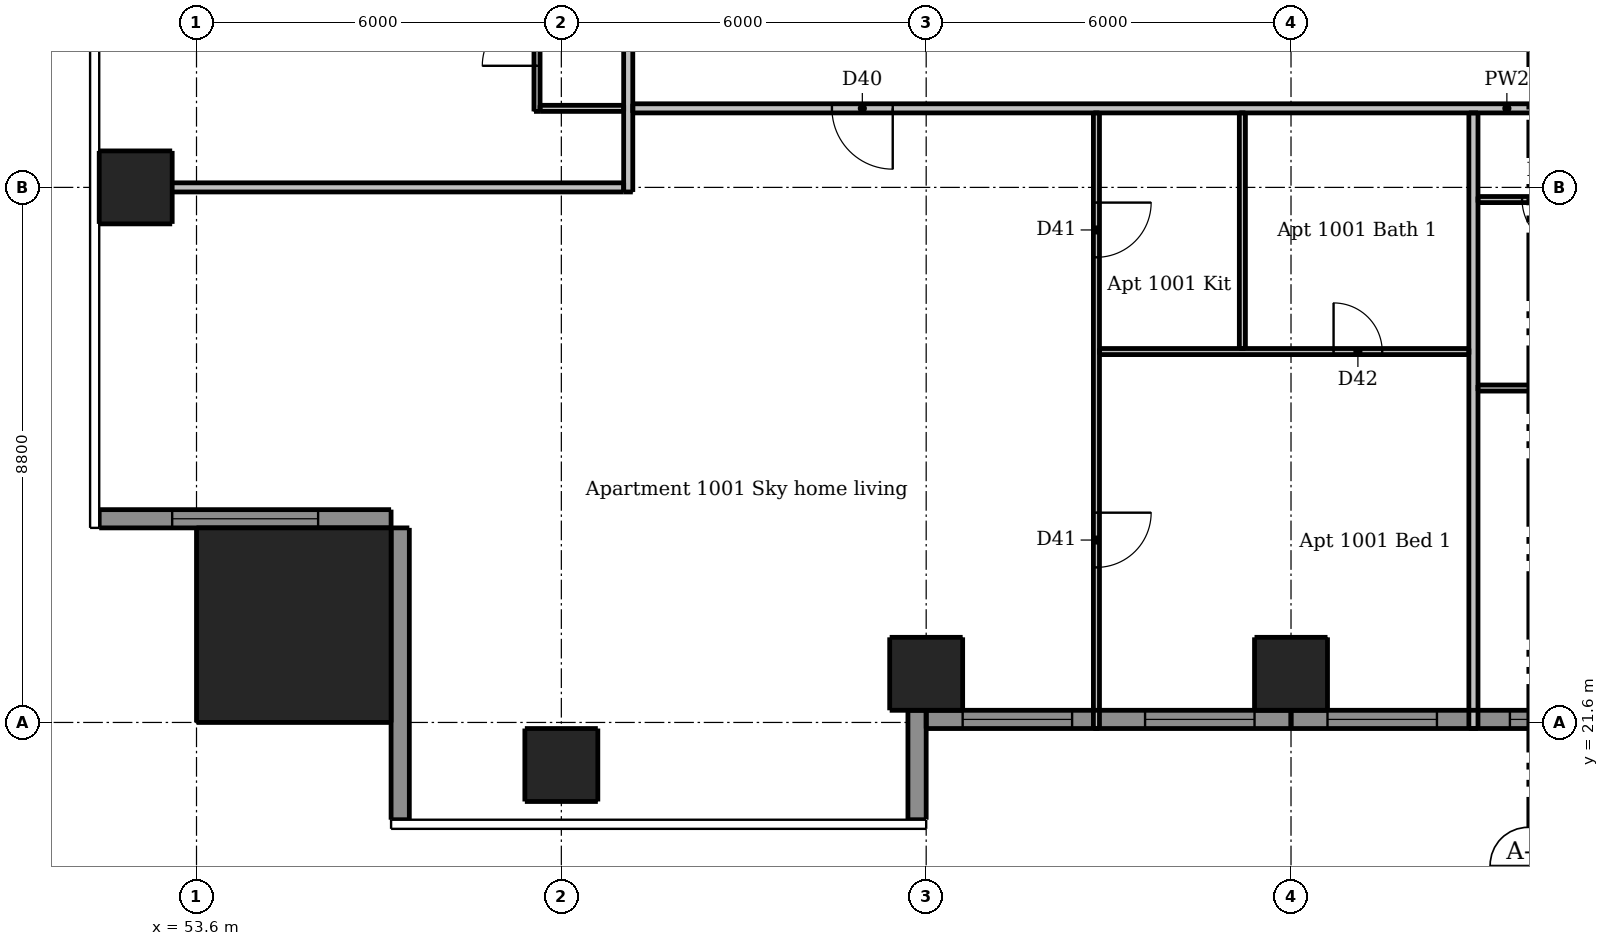
"""IFC4 building model, lengths in metres.
Left out: names, types, materials, properties, quantities, classifications, styles, units other than length and angle.
Written with IfcOpenShell. Run it as: python <this file> out.ifc"""

import sys

from ifc_helpers import new_model, si_unit, direction, frame, frame_2d, origin, origin_2d, place, context, subcontext, project, spatial, rectangle, extrude, element, fill, save


model = new_model("IFC4")
c1 = context("Model", 3, precision=1e-05, world=origin(), true_north=direction((0.0, 1.0)))
c2 = subcontext(c1, "Body", "Model", "MODEL_VIEW")
j1 = project(units=[si_unit("LENGTHUNIT", "METRE"), si_unit("PLANEANGLEUNIT", "RADIAN")], contexts=[c1])
p1 = place(None, origin())
s1 = spatial("IfcSite", under=j1, at=p1, CompositionType="ELEMENT")
p2 = place(p1, origin())
s2 = spatial("IfcBuilding", under=s1, at=p2, CompositionType="ELEMENT")
p3 = place(p2, frame((0.0, 0.0, 40.0)))
s3 = spatial("IfcBuildingStorey", under=s2, at=p3, CompositionType="ELEMENT", Elevation=40.0)
for number, where, z_axis, x_axis in (
    (1, (59.6, 20.9, 0.0), (0.0, 0.0, 1.0), (1.0, 0.0, 0.0)),
    (2, (65.6, 22.4, 0.0), (0.0, 0.0, 1.0), (1.0, 0.0, 0.0)),
    (3, (71.6, 22.4, 0.0), (0.0, 0.0, 1.0), (1.0, 0.0, 0.0)),
    (4, (52.6, 30.4, 0.0), (0.0, 0.0, 1.0), (1.0, 0.0, 0.0)),
):
    element("IfcColumn", number, at=place(p3, frame(where, z_axis=z_axis, x_axis=x_axis)), inside=s3, PredefinedType="COLUMN", context=c2, shape_type="SweptSolid", body=[
        extrude(rectangle(XDim=1.2, YDim=1.2, at=origin_2d()), origin(), (0.0, 0.0, 1.0), 3.05),
    ])
p4 = place(p3, frame((55.2, 23.2, 0.0), z_axis=(0.0, 0.0, 1.0), x_axis=(1.0, 0.0, 0.0)))
e5 = element("IfcColumn", 5, at=p4, inside=s3, PredefinedType="COLUMN", context=c2, shape_type="SweptSolid", body=[
    extrude(rectangle(XDim=3.2, YDim=3.2, at=origin_2d()), origin(), (0.0, 0.0, 1.0), 3.3),
])
p5 = place(p3, frame((65.45, 20.0, 0.0), z_axis=(0.0, 0.0, 1.0), x_axis=(0.0, 1.0, 0.0)))
e6 = element("IfcWall", 6, at=p5, inside=s3, PredefinedType="SOLIDWALL", context=c2, shape_type="SweptSolid", body=[
    extrude(rectangle(XDim=1.8, YDim=0.3, at=frame_2d((0.9, 0.0))), origin(), (0.0, 0.0, 1.0), 3.05),
])
p6 = place(p3, frame((52.0, 24.95, 0.0), z_axis=(0.0, 0.0, 1.0), x_axis=(1.0, 0.0, 0.0)))
e7 = element("IfcWall", 7, at=p6, inside=s3, PredefinedType="SOLIDWALL", context=c2, shape_type="SweptSolid", body=[
    extrude(rectangle(XDim=4.8, YDim=0.3, at=frame_2d((2.4, 0.0))), origin(), (0.0, 0.0, 1.0), 3.05),
])
p7 = place(p6, frame((1.2, 0.0, 0.15)))
e8 = element("IfcOpeningElement", 8, at=p7, cuts=e7, PredefinedType="OPENING", context=c2, shape_type="SweptSolid", body=[
    extrude(rectangle(XDim=2.4, YDim=2.1, at=frame_2d((1.2, 1.05))), frame((0.0, 0.16, 0.0), z_axis=(0.0, -1.0, 0.0), x_axis=(1.0, 0.0, 0.0)), (0.0, 0.0, 1.0), 0.32),
])
p8 = place(p3, frame((56.95, 24.8, 0.0), z_axis=(0.0, 0.0, 1.0), x_axis=(0.0, -1.0, 0.0)))
e9 = element("IfcWall", 9, at=p8, inside=s3, PredefinedType="SOLIDWALL", context=c2, shape_type="SweptSolid", body=[
    extrude(rectangle(XDim=4.8, YDim=0.3, at=frame_2d((2.4, 0.0))), origin(), (0.0, 0.0, 1.0), 3.05),
])
p9 = place(p3, frame((65.6, 21.65, 0.0), z_axis=(0.0, 0.0, 1.0), x_axis=(1.0, 0.0, 0.0)))
e10 = element("IfcWall", 10, at=p9, inside=s3, PredefinedType="SOLIDWALL", context=c2, shape_type="SweptSolid", body=[
    extrude(rectangle(XDim=6.0, YDim=0.3, at=frame_2d((3.0, 0.0))), origin(), (0.0, 0.0, 1.0), 3.05),
])
p10 = place(p9, frame((0.6, 0.0, 0.15)))
e11 = element("IfcOpeningElement", 11, at=p10, cuts=e10, PredefinedType="OPENING", context=c2, shape_type="SweptSolid", body=[
    extrude(rectangle(XDim=1.8, YDim=2.1, at=frame_2d((0.9, 1.05))), frame((0.0, 0.16, 0.0), z_axis=(0.0, -1.0, 0.0), x_axis=(1.0, 0.0, 0.0)), (0.0, 0.0, 1.0), 0.32),
])
p11 = place(p9, frame((3.6, 0.0, 0.15)))
e12 = element("IfcOpeningElement", 12, at=p11, cuts=e10, PredefinedType="OPENING", context=c2, shape_type="SweptSolid", body=[
    extrude(rectangle(XDim=1.8, YDim=2.1, at=frame_2d((0.9, 1.05))), frame((0.0, 0.16, 0.0), z_axis=(0.0, -1.0, 0.0), x_axis=(1.0, 0.0, 0.0)), (0.0, 0.0, 1.0), 0.32),
])
p12 = place(p3, frame((71.6, 21.65, 0.0), z_axis=(0.0, 0.0, 1.0), x_axis=(1.0, 0.0, 0.0)))
e13 = element("IfcWall", 13, at=p12, inside=s3, PredefinedType="SOLIDWALL", context=c2, shape_type="SweptSolid", body=[
    extrude(rectangle(XDim=5.7, YDim=0.3, at=frame_2d((2.85, 0.0))), origin(), (0.0, 0.0, 1.0), 3.05),
])
p13 = place(p12, frame((0.6, 0.0, 0.15)))
e14 = element("IfcOpeningElement", 14, at=p13, cuts=e13, PredefinedType="OPENING", context=c2, shape_type="SweptSolid", body=[
    extrude(rectangle(XDim=1.8, YDim=2.1, at=frame_2d((0.9, 1.05))), frame((0.0, 0.16, 0.0), z_axis=(0.0, -1.0, 0.0), x_axis=(1.0, 0.0, 0.0)), (0.0, 0.0, 1.0), 0.32),
])
p14 = place(p12, frame((3.6, 0.0, 0.15)))
e15 = element("IfcOpeningElement", 15, at=p14, cuts=e13, PredefinedType="OPENING", context=c2, shape_type="SweptSolid", body=[
    extrude(rectangle(XDim=1.8, YDim=2.1, at=frame_2d((0.9, 1.05))), frame((0.0, 0.16, 0.0), z_axis=(0.0, -1.0, 0.0), x_axis=(1.0, 0.0, 0.0)), (0.0, 0.0, 1.0), 0.32),
])
p15 = place(p3, frame((59.2, 31.65, 0.0), z_axis=(0.0, 0.0, 1.0), x_axis=(0.0, 1.0, 0.0)))
e16 = element("IfcWall", 16, at=p15, inside=s3, PredefinedType="PARTITIONING", context=c2, shape_type="SweptSolid", body=[
    extrude(rectangle(XDim=16.675, YDim=0.1, at=frame_2d((8.337, 0.0))), origin(), (0.0, 0.0, 1.0), 3.05),
])
p16 = place(p15, frame((9.7, 0.0, 0.0)))
e17 = element("IfcOpeningElement", 17, at=p16, cuts=e16, PredefinedType="OPENING", context=c2, shape_type="SweptSolid", body=[
    extrude(rectangle(XDim=0.9, YDim=2.1, at=frame_2d((0.45, 1.05))), frame((0.0, 0.06, 0.0), z_axis=(0.0, -1.0, 0.0), x_axis=(1.0, 0.0, 0.0)), (0.0, 0.0, 1.0), 0.12),
])
p17 = place(p15, frame((14.8, 0.0, 0.0)))
e18 = element("IfcOpeningElement", 18, at=p17, cuts=e16, PredefinedType="OPENING", context=c2, shape_type="SweptSolid", body=[
    extrude(rectangle(XDim=0.9, YDim=2.1, at=frame_2d((0.45, 1.05))), frame((0.0, 0.06, 0.0), z_axis=(0.0, -1.0, 0.0), x_axis=(1.0, 0.0, 0.0)), (0.0, 0.0, 1.0), 0.12),
])
p18 = place(p15, frame((5.25, 0.0, 0.0)))
e19 = element("IfcOpeningElement", 19, at=p18, cuts=e16, PredefinedType="OPENING", context=c2, shape_type="SweptSolid", body=[
    extrude(rectangle(XDim=0.8, YDim=2.1, at=frame_2d((0.4, 1.05))), frame((0.0, 0.06, 0.0), z_axis=(0.0, -1.0, 0.0), x_axis=(1.0, 0.0, 0.0)), (0.0, 0.0, 1.0), 0.12),
])
p19 = place(p15, frame((0.75, 0.0, 0.0)))
e20 = element("IfcOpeningElement", 20, at=p19, cuts=e16, PredefinedType="OPENING", context=c2, shape_type="SweptSolid", body=[
    extrude(rectangle(XDim=0.9, YDim=2.1, at=frame_2d((0.45, 1.05))), frame((0.0, 0.06, 0.0), z_axis=(0.0, -1.0, 0.0), x_axis=(1.0, 0.0, 0.0)), (0.0, 0.0, 1.0), 0.12),
])
p20 = place(p15, frame((3.15, 0.0, 0.0)))
e21 = element("IfcOpeningElement", 21, at=p20, cuts=e16, PredefinedType="OPENING", context=c2, shape_type="SweptSolid", body=[
    extrude(rectangle(XDim=0.8, YDim=2.1, at=frame_2d((0.4, 1.05))), frame((0.0, 0.06, 0.0), z_axis=(0.0, -1.0, 0.0), x_axis=(1.0, 0.0, 0.0)), (0.0, 0.0, 1.0), 0.12),
])
p21 = place(p3, frame((68.4, 31.625, 0.0), z_axis=(0.0, 0.0, 1.0), x_axis=(0.0, -1.0, 0.0)))
e22 = element("IfcWall", 22, at=p21, inside=s3, PredefinedType="PARTITIONING", context=c2, shape_type="SweptSolid", body=[
    extrude(rectangle(XDim=10.125, YDim=0.1, at=frame_2d((5.062, 0.0))), origin(), (0.0, 0.0, 1.0), 3.05),
])
p22 = place(p21, frame((1.475, 0.0, 0.0)))
e23 = element("IfcOpeningElement", 23, at=p22, cuts=e22, PredefinedType="OPENING", context=c2, shape_type="SweptSolid", body=[
    extrude(rectangle(XDim=0.9, YDim=2.1, at=frame_2d((0.45, 1.05))), frame((0.0, 0.06, 0.0), z_axis=(0.0, -1.0, 0.0), x_axis=(1.0, 0.0, 0.0)), (0.0, 0.0, 1.0), 0.12),
])
p23 = place(p21, frame((6.575, 0.0, 0.0)))
e24 = element("IfcOpeningElement", 24, at=p23, cuts=e22, PredefinedType="OPENING", context=c2, shape_type="SweptSolid", body=[
    extrude(rectangle(XDim=0.9, YDim=2.1, at=frame_2d((0.45, 1.05))), frame((0.0, 0.06, 0.0), z_axis=(0.0, -1.0, 0.0), x_axis=(1.0, 0.0, 0.0)), (0.0, 0.0, 1.0), 0.12),
])
p24 = place(p3, frame((70.8, 27.75, 0.0), z_axis=(0.0, 0.0, 1.0), x_axis=(0.0, 1.0, 0.0)))
e25 = element("IfcWall", 25, at=p24, inside=s3, PredefinedType="PARTITIONING", context=c2, shape_type="SweptSolid", body=[
    extrude(rectangle(XDim=3.875, YDim=0.1, at=frame_2d((1.938, 0.0))), origin(), (0.0, 0.0, 1.0), 3.05),
])
p25 = place(p3, frame((59.25, 31.7, 0.0), z_axis=(0.0, 0.0, 1.0), x_axis=(1.0, 0.0, 0.0)))
e26 = element("IfcWall", 26, at=p25, inside=s3, PredefinedType="PARTITIONING", context=c2, shape_type="SweptSolid", body=[
    extrude(rectangle(XDim=1.375, YDim=0.1, at=frame_2d((0.688, 0.0))), origin(), (0.0, 0.0, 1.0), 3.05),
])
p26 = place(p3, frame((88.25, 30.2, 0.0), z_axis=(0.0, 0.0, 1.0), x_axis=(-1.0, 0.0, 0.0)))
e27 = element("IfcWall", 27, at=p26, inside=s3, PredefinedType="PARTITIONING", context=c2, shape_type="SweptSolid", body=[
    extrude(rectangle(XDim=13.575, YDim=0.1, at=frame_2d((6.788, 0.0))), origin(), (0.0, 0.0, 1.0), 3.05),
])
p27 = place(p26, frame((7.5, 0.0, 0.0)))
e28 = element("IfcOpeningElement", 28, at=p27, cuts=e27, PredefinedType="OPENING", context=c2, shape_type="SweptSolid", body=[
    extrude(rectangle(XDim=0.9, YDim=2.1, at=frame_2d((0.45, 1.05))), frame((0.0, 0.06, 0.0), z_axis=(0.0, -1.0, 0.0), x_axis=(1.0, 0.0, 0.0)), (0.0, 0.0, 1.0), 0.12),
])
p28 = place(p26, frame((2.7, 0.0, 0.0)))
e29 = element("IfcOpeningElement", 29, at=p28, cuts=e27, PredefinedType="OPENING", context=c2, shape_type="SweptSolid", body=[
    extrude(rectangle(XDim=0.9, YDim=2.1, at=frame_2d((0.45, 1.05))), frame((0.0, 0.06, 0.0), z_axis=(0.0, -1.0, 0.0), x_axis=(1.0, 0.0, 0.0)), (0.0, 0.0, 1.0), 0.12),
])
p29 = place(p26, frame((0.35, 0.0, 0.0)))
e30 = element("IfcOpeningElement", 30, at=p29, cuts=e27, PredefinedType="OPENING", context=c2, shape_type="SweptSolid", body=[
    extrude(rectangle(XDim=0.9, YDim=2.1, at=frame_2d((0.45, 1.05))), frame((0.0, 0.06, 0.0), z_axis=(0.0, -1.0, 0.0), x_axis=(1.0, 0.0, 0.0)), (0.0, 0.0, 1.0), 0.12),
])
p30 = place(p26, frame((12.05, 0.0, 0.0)))
e31 = element("IfcOpeningElement", 31, at=p30, cuts=e27, PredefinedType="OPENING", context=c2, shape_type="SweptSolid", body=[
    extrude(rectangle(XDim=0.8, YDim=2.1, at=frame_2d((0.4, 1.05))), frame((0.0, 0.06, 0.0), z_axis=(0.0, -1.0, 0.0), x_axis=(1.0, 0.0, 0.0)), (0.0, 0.0, 1.0), 0.12),
])
p31 = place(p3, frame((68.45, 27.7, 0.0), z_axis=(0.0, 0.0, 1.0), x_axis=(1.0, 0.0, 0.0)))
e32 = element("IfcWall", 32, at=p31, inside=s3, PredefinedType="PARTITIONING", context=c2, shape_type="SweptSolid", body=[
    extrude(rectangle(XDim=6.075, YDim=0.1, at=frame_2d((3.038, 0.0))), origin(), (0.0, 0.0, 1.0), 3.05),
])
p32 = place(p31, frame((3.85, 0.0, 0.0)))
e33 = element("IfcOpeningElement", 33, at=p32, cuts=e32, PredefinedType="OPENING", context=c2, shape_type="SweptSolid", body=[
    extrude(rectangle(XDim=0.8, YDim=2.1, at=frame_2d((0.4, 1.05))), frame((0.0, 0.06, 0.0), z_axis=(0.0, -1.0, 0.0), x_axis=(1.0, 0.0, 0.0)), (0.0, 0.0, 1.0), 0.12),
])
p33 = place(p3, frame((74.675, 27.1, 0.0), z_axis=(0.0, 0.0, 1.0), x_axis=(1.0, 0.0, 0.0)))
e34 = element("IfcWall", 34, at=p33, inside=s3, PredefinedType="PARTITIONING", context=c2, shape_type="SweptSolid", body=[
    extrude(rectangle(XDim=2.275, YDim=0.1, at=frame_2d((1.137, 0.0))), origin(), (0.0, 0.0, 1.0), 3.05),
])
p34 = place(p3, frame((60.7, 30.325, 0.0), z_axis=(0.0, 0.0, 1.0), x_axis=(0.0, 1.0, 0.0)))
e35 = element("IfcWall", 35, at=p34, inside=s3, PredefinedType="PARTITIONING", context=c2, shape_type="SweptSolid", body=[
    extrude(rectangle(XDim=28.9, YDim=0.15, at=frame_2d((14.45, 0.0))), origin(), (0.0, 0.0, 1.0), 3.05),
])
p35 = place(p34, frame((9.225, 0.0, 0.0)))
e36 = element("IfcOpeningElement", 36, at=p35, cuts=e35, PredefinedType="OPENING", context=c2, shape_type="SweptSolid", body=[
    extrude(rectangle(XDim=1.0, YDim=2.1, at=frame_2d((0.5, 1.05))), frame((0.0, 0.085, 0.0), z_axis=(0.0, -1.0, 0.0), x_axis=(1.0, 0.0, 0.0)), (0.0, 0.0, 1.0), 0.17),
])
p36 = place(p34, frame((26.025, 0.0, 0.0)))
e37 = element("IfcOpeningElement", 37, at=p36, cuts=e35, PredefinedType="OPENING", context=c2, shape_type="SweptSolid", body=[
    extrude(rectangle(XDim=1.0, YDim=2.1, at=frame_2d((0.5, 1.05))), frame((0.0, 0.085, 0.0), z_axis=(0.0, -1.0, 0.0), x_axis=(1.0, 0.0, 0.0)), (0.0, 0.0, 1.0), 0.17),
])
p37 = place(p3, frame((74.6, 21.5, 0.0), z_axis=(0.0, 0.0, 1.0), x_axis=(0.0, 1.0, 0.0)))
e38 = element("IfcWall", 38, at=p37, inside=s3, PredefinedType="PARTITIONING", context=c2, shape_type="SweptSolid", body=[
    extrude(rectangle(XDim=10.125, YDim=0.15, at=frame_2d((5.062, 0.0))), origin(), (0.0, 0.0, 1.0), 3.05),
])
p38 = place(p3, frame((89.525, 31.7, 0.0), z_axis=(0.0, 0.0, 1.0), x_axis=(-1.0, 0.0, 0.0)))
e39 = element("IfcWall", 39, at=p38, inside=s3, PredefinedType="PARTITIONING", context=c2, shape_type="SweptSolid", body=[
    extrude(rectangle(XDim=28.75, YDim=0.15, at=frame_2d((14.375, 0.0))), origin(), (0.0, 0.0, 1.0), 3.05),
])
p39 = place(p38, frame((24.475, 0.0, 0.0)))
e40 = element("IfcOpeningElement", 40, at=p39, cuts=e39, PredefinedType="OPENING", context=c2, shape_type="SweptSolid", body=[
    extrude(rectangle(XDim=1.0, YDim=2.1, at=frame_2d((0.5, 1.05))), frame((0.0, 0.085, 0.0), z_axis=(0.0, -1.0, 0.0), x_axis=(1.0, 0.0, 0.0)), (0.0, 0.0, 1.0), 0.17),
])
p40 = place(p38, frame((7.575, 0.0, 0.0)))
e41 = element("IfcOpeningElement", 41, at=p40, cuts=e39, PredefinedType="OPENING", context=c2, shape_type="SweptSolid", body=[
    extrude(rectangle(XDim=1.0, YDim=2.1, at=frame_2d((0.5, 1.05))), frame((0.0, 0.085, 0.0), z_axis=(0.0, -1.0, 0.0), x_axis=(1.0, 0.0, 0.0)), (0.0, 0.0, 1.0), 0.17),
])
p41 = place(p3, frame((52.0, 30.4, 0.0), z_axis=(0.0, 0.0, 1.0), x_axis=(1.0, 0.0, 0.0)))
e42 = element("IfcWall", 42, at=p41, inside=s3, PredefinedType="PARTITIONING", context=c2, shape_type="SweptSolid", body=[
    extrude(rectangle(XDim=8.625, YDim=0.15, at=frame_2d((4.312, 0.0))), origin(), (0.0, 0.0, 1.0), 2.647),
])
p42 = place(p7, origin())
e43 = element("IfcWindow", 43, at=p42, inside=s3, PartitioningType="DOUBLE_PANEL_VERTICAL", PredefinedType="WINDOW", context=c2, shape_type="SweptSolid", body=[
    extrude(rectangle(XDim=2.4, YDim=2.1, at=frame_2d((1.2, 1.05))), frame((0.0, 0.03, 0.0), z_axis=(0.0, -1.0, 0.0), x_axis=(1.0, 0.0, 0.0)), (0.0, 0.0, 1.0), 0.06),
])
fill(e8, e43)
p43 = place(p10, origin())
e44 = element("IfcWindow", 44, at=p43, inside=s3, PartitioningType="DOUBLE_PANEL_VERTICAL", PredefinedType="WINDOW", context=c2, shape_type="SweptSolid", body=[
    extrude(rectangle(XDim=1.8, YDim=2.1, at=frame_2d((0.9, 1.05))), frame((0.0, 0.03, 0.0), z_axis=(0.0, -1.0, 0.0), x_axis=(1.0, 0.0, 0.0)), (0.0, 0.0, 1.0), 0.06),
])
fill(e11, e44)
p44 = place(p11, origin())
e45 = element("IfcWindow", 45, at=p44, inside=s3, PartitioningType="DOUBLE_PANEL_VERTICAL", PredefinedType="WINDOW", context=c2, shape_type="SweptSolid", body=[
    extrude(rectangle(XDim=1.8, YDim=2.1, at=frame_2d((0.9, 1.05))), frame((0.0, 0.03, 0.0), z_axis=(0.0, -1.0, 0.0), x_axis=(1.0, 0.0, 0.0)), (0.0, 0.0, 1.0), 0.06),
])
fill(e12, e45)
p45 = place(p13, origin())
e46 = element("IfcWindow", 46, at=p45, inside=s3, PartitioningType="DOUBLE_PANEL_VERTICAL", PredefinedType="WINDOW", context=c2, shape_type="SweptSolid", body=[
    extrude(rectangle(XDim=1.8, YDim=2.1, at=frame_2d((0.9, 1.05))), frame((0.0, 0.03, 0.0), z_axis=(0.0, -1.0, 0.0), x_axis=(1.0, 0.0, 0.0)), (0.0, 0.0, 1.0), 0.06),
])
fill(e14, e46)
p46 = place(p14, origin())
e47 = element("IfcWindow", 47, at=p46, inside=s3, PartitioningType="DOUBLE_PANEL_VERTICAL", PredefinedType="WINDOW", context=c2, shape_type="SweptSolid", body=[
    extrude(rectangle(XDim=1.8, YDim=2.1, at=frame_2d((0.9, 1.05))), frame((0.0, 0.03, 0.0), z_axis=(0.0, -1.0, 0.0), x_axis=(1.0, 0.0, 0.0)), (0.0, 0.0, 1.0), 0.06),
])
fill(e15, e47)
p47 = place(p39, origin())
e48 = element("IfcDoor", 48, at=p47, inside=s3, OperationType="SINGLE_SWING_LEFT", PredefinedType="DOOR", context=c2, shape_type="SweptSolid", body=[
    extrude(rectangle(XDim=1.0, YDim=2.1, at=frame_2d((0.5, 1.05))), frame((0.0, 0.025, 0.0), z_axis=(0.0, -1.0, 0.0), x_axis=(1.0, 0.0, 0.0)), (0.0, 0.0, 1.0), 0.05),
])
fill(e40, e48)
p48 = place(p22, origin())
e49 = element("IfcDoor", 49, at=p48, inside=s3, OperationType="SINGLE_SWING_LEFT", PredefinedType="DOOR", context=c2, shape_type="SweptSolid", body=[
    extrude(rectangle(XDim=0.9, YDim=2.1, at=frame_2d((0.45, 1.05))), frame((0.0, 0.025, 0.0), z_axis=(0.0, -1.0, 0.0), x_axis=(1.0, 0.0, 0.0)), (0.0, 0.0, 1.0), 0.05),
])
fill(e23, e49)
p49 = place(p23, origin())
e50 = element("IfcDoor", 50, at=p49, inside=s3, OperationType="SINGLE_SWING_LEFT", PredefinedType="DOOR", context=c2, shape_type="SweptSolid", body=[
    extrude(rectangle(XDim=0.9, YDim=2.1, at=frame_2d((0.45, 1.05))), frame((0.0, 0.025, 0.0), z_axis=(0.0, -1.0, 0.0), x_axis=(1.0, 0.0, 0.0)), (0.0, 0.0, 1.0), 0.05),
])
fill(e24, e50)
p50 = place(p32, origin())
e51 = element("IfcDoor", 51, at=p50, inside=s3, OperationType="SINGLE_SWING_LEFT", PredefinedType="DOOR", context=c2, shape_type="SweptSolid", body=[
    extrude(rectangle(XDim=0.8, YDim=2.1, at=frame_2d((0.4, 1.05))), frame((0.0, 0.025, 0.0), z_axis=(0.0, -1.0, 0.0), x_axis=(1.0, 0.0, 0.0)), (0.0, 0.0, 1.0), 0.05),
])
fill(e33, e51)
p51 = place(p30, origin())
e52 = element("IfcDoor", 52, at=p51, inside=s3, OperationType="SINGLE_SWING_LEFT", PredefinedType="DOOR", context=c2, shape_type="SweptSolid", body=[
    extrude(rectangle(XDim=0.8, YDim=2.1, at=frame_2d((0.4, 1.05))), frame((0.0, 0.025, 0.0), z_axis=(0.0, -1.0, 0.0), x_axis=(1.0, 0.0, 0.0)), (0.0, 0.0, 1.0), 0.05),
])
fill(e31, e52)
p52 = place(p19, origin())
e53 = element("IfcDoor", 53, at=p52, inside=s3, OperationType="SINGLE_SWING_LEFT", PredefinedType="DOOR", context=c2, shape_type="SweptSolid", body=[
    extrude(rectangle(XDim=0.9, YDim=2.1, at=frame_2d((0.45, 1.05))), frame((0.0, 0.025, 0.0), z_axis=(0.0, -1.0, 0.0), x_axis=(1.0, 0.0, 0.0)), (0.0, 0.0, 1.0), 0.05),
])
fill(e20, e53)
save(model, sys.argv[1])
